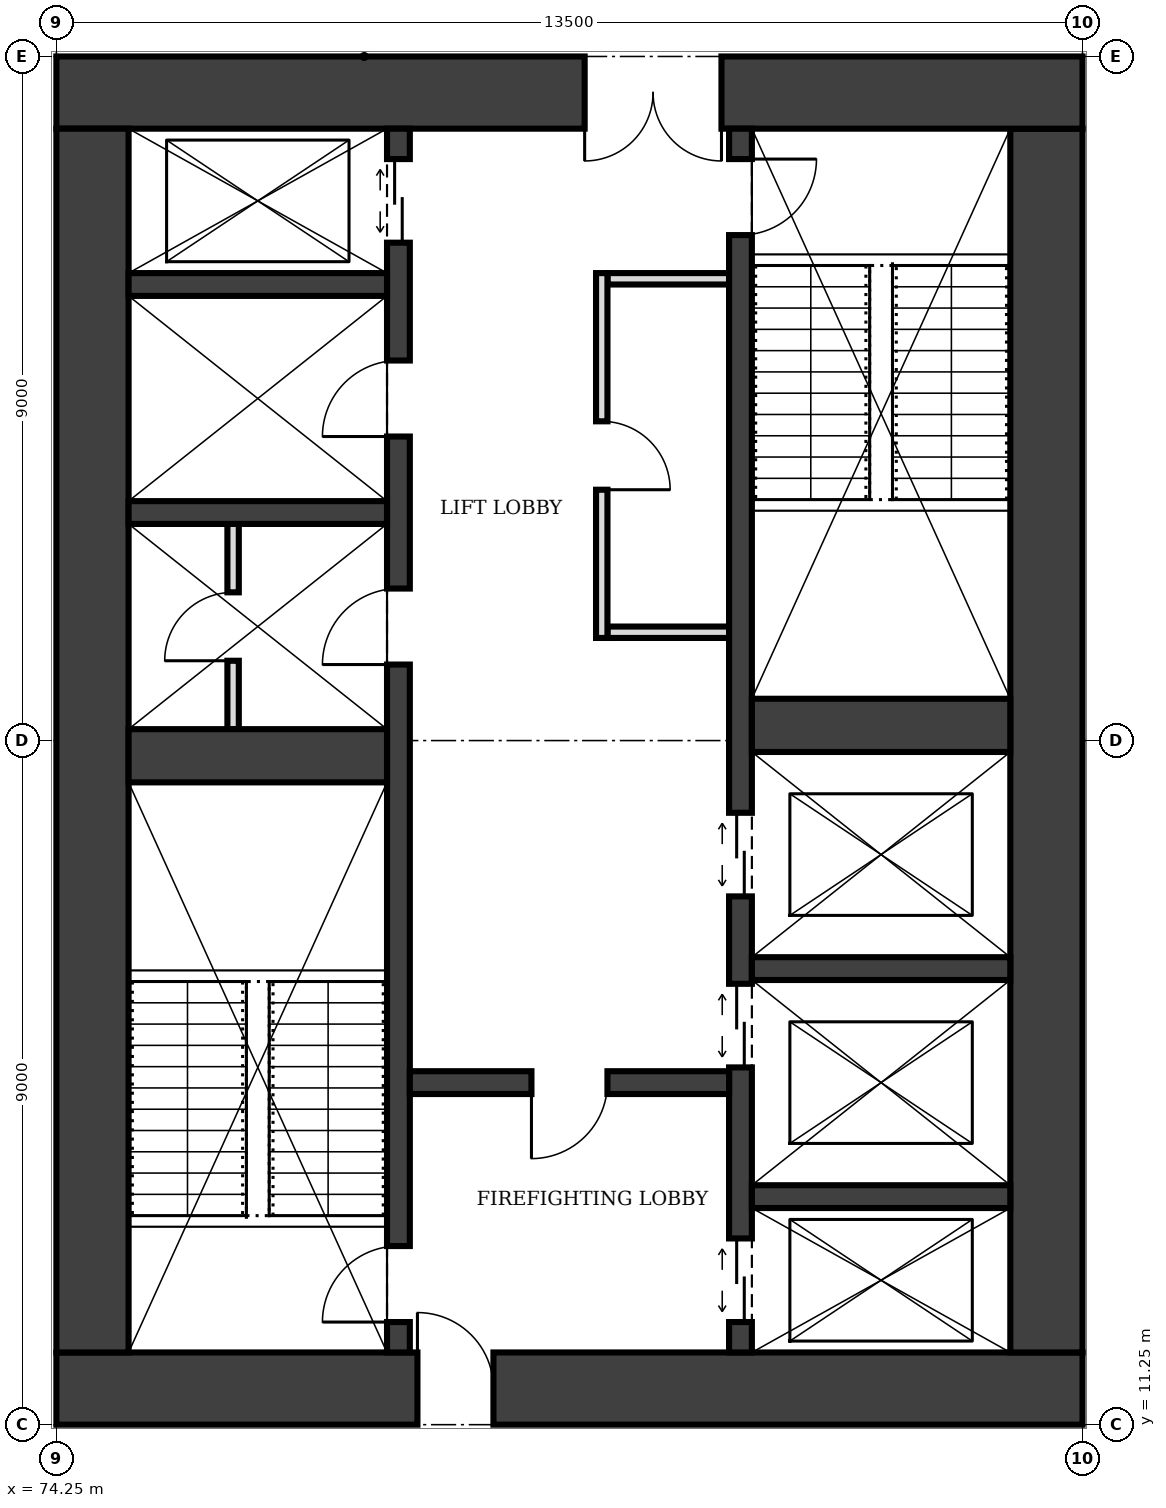
"""IFC4 building model, lengths in metres.
Left out: names, types, materials, properties, quantities, classifications, styles, units other than length and angle.
Written with IfcOpenShell. Run it as: python <this file> out.ifc"""

import sys

from ifc_helpers import new_model, si_unit, direction, frame, frame_2d, origin, place, context, subcontext, project, spatial, rectangle, extrude, element, fill, save


model = new_model("IFC4")
c1 = context("Model", 3, precision=1e-05, world=origin(), true_north=direction((0.0, 1.0)))
c2 = subcontext(c1, "Body", "Model", "MODEL_VIEW")
j1 = project(units=[si_unit("LENGTHUNIT", "METRE"), si_unit("PLANEANGLEUNIT", "RADIAN")], contexts=[c1])
p1 = place(None, origin())
s1 = spatial("IfcSite", under=j1, at=p1, CompositionType="ELEMENT")
p2 = place(p1, origin())
s2 = spatial("IfcBuilding", under=s1, at=p2, CompositionType="ELEMENT")
p3 = place(p2, frame((0.0, 0.0, 193.0)))
s3 = spatial("IfcBuildingStorey", under=s2, at=p3, CompositionType="ELEMENT", Elevation=193.0)
p4 = place(p3, frame((74.25, 11.725, 0.0), z_axis=(0.0, 0.0, 1.0), x_axis=(1.0, 0.0, 0.0)))
e1 = element("IfcWall", 1, at=p4, inside=s3, PredefinedType="SHEAR", context=c2, shape_type="SweptSolid", body=[
    extrude(rectangle(XDim=13.5, YDim=0.95, at=frame_2d((6.75, 0.0))), origin(), (0.0, 0.0, 1.0), 4.0),
])
p5 = place(p4, frame((4.75, 0.0, 0.0)))
e2 = element("IfcOpeningElement", 2, at=p5, cuts=e1, PredefinedType="OPENING", context=c2, shape_type="SweptSolid", body=[
    extrude(rectangle(XDim=1.0, YDim=2.1, at=frame_2d((0.5, 1.05))), frame((0.0, 0.485, 0.0), z_axis=(0.0, -1.0, 0.0), x_axis=(1.0, 0.0, 0.0)), (0.0, 0.0, 1.0), 0.97),
])
p6 = place(p3, frame((87.275, 12.2, 0.0), z_axis=(0.0, 0.0, 1.0), x_axis=(0.0, 1.0, 0.0)))
e3 = element("IfcWall", 3, at=p6, inside=s3, PredefinedType="SHEAR", context=c2, shape_type="SweptSolid", body=[
    extrude(rectangle(XDim=16.1, YDim=0.95, at=frame_2d((8.05, 0.0))), origin(), (0.0, 0.0, 1.0), 4.0),
])
p7 = place(p3, frame((87.75, 28.775, 0.0), z_axis=(0.0, 0.0, 1.0), x_axis=(-1.0, 0.0, 0.0)))
e4 = element("IfcWall", 4, at=p7, inside=s3, PredefinedType="SHEAR", context=c2, shape_type="SweptSolid", body=[
    extrude(rectangle(XDim=13.5, YDim=0.95, at=frame_2d((6.75, 0.0))), origin(), (0.0, 0.0, 1.0), 4.0),
])
p8 = place(p7, frame((4.75, 0.0, 0.0)))
e5 = element("IfcOpeningElement", 5, at=p8, cuts=e4, PredefinedType="OPENING", context=c2, shape_type="SweptSolid", body=[
    extrude(rectangle(XDim=1.8, YDim=2.1, at=frame_2d((0.9, 1.05))), frame((0.0, 0.485, 0.0), z_axis=(0.0, -1.0, 0.0), x_axis=(1.0, 0.0, 0.0)), (0.0, 0.0, 1.0), 0.97),
])
p9 = place(p3, frame((74.725, 28.3, 0.0), z_axis=(0.0, 0.0, 1.0), x_axis=(0.0, -1.0, 0.0)))
e6 = element("IfcWall", 6, at=p9, inside=s3, PredefinedType="SHEAR", context=c2, shape_type="SweptSolid", body=[
    extrude(rectangle(XDim=16.1, YDim=0.95, at=frame_2d((8.05, 0.0))), origin(), (0.0, 0.0, 1.0), 4.0),
])
p10 = place(p3, frame((78.75, 12.2, 0.0), z_axis=(0.0, 0.0, 1.0), x_axis=(0.0, 1.0, 0.0)))
e7 = element("IfcWall", 7, at=p10, inside=s3, PredefinedType="SHEAR", context=c2, shape_type="SweptSolid", body=[
    extrude(rectangle(XDim=16.1, YDim=0.3, at=frame_2d((8.05, 0.0))), origin(), (0.0, 0.0, 1.0), 4.0),
])
p11 = place(p10, frame((0.4, 0.0, 0.0)))
e8 = element("IfcOpeningElement", 8, at=p11, cuts=e7, PredefinedType="OPENING", context=c2, shape_type="SweptSolid", body=[
    extrude(rectangle(XDim=1.0, YDim=2.1, at=frame_2d((0.5, 1.05))), frame((0.0, 0.16, 0.0), z_axis=(0.0, -1.0, 0.0), x_axis=(1.0, 0.0, 0.0)), (0.0, 0.0, 1.0), 0.32),
])
p12 = place(p10, frame((14.6, 0.0, 0.0)))
e9 = element("IfcOpeningElement", 9, at=p12, cuts=e7, PredefinedType="OPENING", context=c2, shape_type="SweptSolid", body=[
    extrude(rectangle(XDim=1.1, YDim=2.1, at=frame_2d((0.55, 1.05))), frame((0.0, 0.16, 0.0), z_axis=(0.0, -1.0, 0.0), x_axis=(1.0, 0.0, 0.0)), (0.0, 0.0, 1.0), 0.32),
])
p13 = place(p10, frame((9.05, 0.0, 0.0)))
e10 = element("IfcOpeningElement", 10, at=p13, cuts=e7, PredefinedType="OPENING", context=c2, shape_type="SweptSolid", body=[
    extrude(rectangle(XDim=1.0, YDim=2.1, at=frame_2d((0.5, 1.05))), frame((0.0, 0.16, 0.0), z_axis=(0.0, -1.0, 0.0), x_axis=(1.0, 0.0, 0.0)), (0.0, 0.0, 1.0), 0.32),
])
p14 = place(p10, frame((12.05, 0.0, 0.0)))
e11 = element("IfcOpeningElement", 11, at=p14, cuts=e7, PredefinedType="OPENING", context=c2, shape_type="SweptSolid", body=[
    extrude(rectangle(XDim=1.0, YDim=2.1, at=frame_2d((0.5, 1.05))), frame((0.0, 0.16, 0.0), z_axis=(0.0, -1.0, 0.0), x_axis=(1.0, 0.0, 0.0)), (0.0, 0.0, 1.0), 0.32),
])
p15 = place(p3, frame((83.25, 12.2, 0.0), z_axis=(0.0, 0.0, 1.0), x_axis=(0.0, 1.0, 0.0)))
e12 = element("IfcWall", 12, at=p15, inside=s3, PredefinedType="SHEAR", context=c2, shape_type="SweptSolid", body=[
    extrude(rectangle(XDim=16.1, YDim=0.3, at=frame_2d((8.05, 0.0))), origin(), (0.0, 0.0, 1.0), 4.0),
])
p16 = place(p15, frame((14.7, 0.0, 0.0)))
e13 = element("IfcOpeningElement", 13, at=p16, cuts=e12, PredefinedType="OPENING", context=c2, shape_type="SweptSolid", body=[
    extrude(rectangle(XDim=1.0, YDim=2.1, at=frame_2d((0.5, 1.05))), frame((0.0, 0.16, 0.0), z_axis=(0.0, -1.0, 0.0), x_axis=(1.0, 0.0, 0.0)), (0.0, 0.0, 1.0), 0.32),
])
p17 = place(p15, frame((0.4, 0.0, 0.0)))
e14 = element("IfcOpeningElement", 14, at=p17, cuts=e12, PredefinedType="OPENING", context=c2, shape_type="SweptSolid", body=[
    extrude(rectangle(XDim=1.1, YDim=2.1, at=frame_2d((0.55, 1.05))), frame((0.0, 0.16, 0.0), z_axis=(0.0, -1.0, 0.0), x_axis=(1.0, 0.0, 0.0)), (0.0, 0.0, 1.0), 0.32),
])
p18 = place(p15, frame((3.75, 0.0, 0.0)))
e15 = element("IfcOpeningElement", 15, at=p18, cuts=e12, PredefinedType="OPENING", context=c2, shape_type="SweptSolid", body=[
    extrude(rectangle(XDim=1.1, YDim=2.1, at=frame_2d((0.55, 1.05))), frame((0.0, 0.16, 0.0), z_axis=(0.0, -1.0, 0.0), x_axis=(1.0, 0.0, 0.0)), (0.0, 0.0, 1.0), 0.32),
])
p19 = place(p15, frame((6.0, 0.0, 0.0)))
e16 = element("IfcOpeningElement", 16, at=p19, cuts=e12, PredefinedType="OPENING", context=c2, shape_type="SweptSolid", body=[
    extrude(rectangle(XDim=1.1, YDim=2.1, at=frame_2d((0.55, 1.05))), frame((0.0, 0.16, 0.0), z_axis=(0.0, -1.0, 0.0), x_axis=(1.0, 0.0, 0.0)), (0.0, 0.0, 1.0), 0.32),
])
p20 = place(p3, frame((75.2, 20.05, 0.0), z_axis=(0.0, 0.0, 1.0), x_axis=(1.0, 0.0, 0.0)))
e17 = element("IfcWall", 17, at=p20, inside=s3, PredefinedType="SHEAR", context=c2, shape_type="SweptSolid", body=[
    extrude(rectangle(XDim=3.4, YDim=0.7, at=frame_2d((1.7, 0.0))), origin(), (0.0, 0.0, 1.0), 4.0),
])
p21 = place(p3, frame((78.9, 15.75, 0.0), z_axis=(0.0, 0.0, 1.0), x_axis=(1.0, 0.0, 0.0)))
e18 = element("IfcWall", 18, at=p21, inside=s3, PredefinedType="SHEAR", context=c2, shape_type="SweptSolid", body=[
    extrude(rectangle(XDim=4.2, YDim=0.3, at=frame_2d((2.1, 0.0))), origin(), (0.0, 0.0, 1.0), 4.0),
])
p22 = place(p21, frame((1.6, 0.0, 0.0)))
e19 = element("IfcOpeningElement", 19, at=p22, cuts=e18, PredefinedType="OPENING", context=c2, shape_type="SweptSolid", body=[
    extrude(rectangle(XDim=1.0, YDim=2.1, at=frame_2d((0.5, 1.05))), frame((0.0, 0.16, 0.0), z_axis=(0.0, -1.0, 0.0), x_axis=(1.0, 0.0, 0.0)), (0.0, 0.0, 1.0), 0.32),
])
for number, where, z_axis, x_axis in (
    (20, (83.4, 14.25, 0.0), (0.0, 0.0, 1.0), (1.0, 0.0, 0.0)),
    (21, (83.4, 17.25, 0.0), (0.0, 0.0, 1.0), (1.0, 0.0, 0.0)),
):
    element("IfcWall", number, at=place(p3, frame(where, z_axis=z_axis, x_axis=x_axis)), inside=s3, PredefinedType="SHEAR", context=c2, shape_type="SweptSolid", body=[
        extrude(rectangle(XDim=3.4, YDim=0.3, at=frame_2d((1.7, 0.0))), origin(), (0.0, 0.0, 1.0), 4.0),
    ])
p23 = place(p3, frame((83.4, 20.45, 0.0), z_axis=(0.0, 0.0, 1.0), x_axis=(1.0, 0.0, 0.0)))
e22 = element("IfcWall", 22, at=p23, inside=s3, PredefinedType="SHEAR", context=c2, shape_type="SweptSolid", body=[
    extrude(rectangle(XDim=3.4, YDim=0.7, at=frame_2d((1.7, 0.0))), origin(), (0.0, 0.0, 1.0), 4.0),
])
for number, where, z_axis, x_axis in (
    (23, (75.2, 23.25, 0.0), (0.0, 0.0, 1.0), (1.0, 0.0, 0.0)),
    (24, (75.2, 26.25, 0.0), (0.0, 0.0, 1.0), (1.0, 0.0, 0.0)),
):
    element("IfcWall", number, at=place(p3, frame(where, z_axis=z_axis, x_axis=x_axis)), inside=s3, PredefinedType="SHEAR", context=c2, shape_type="SweptSolid", body=[
        extrude(rectangle(XDim=3.4, YDim=0.3, at=frame_2d((1.7, 0.0))), origin(), (0.0, 0.0, 1.0), 4.0),
    ])
p24 = place(p3, frame((81.425, 21.6, 0.0), z_axis=(0.0, 0.0, 1.0), x_axis=(0.0, 1.0, 0.0)))
e25 = element("IfcWall", 25, at=p24, inside=s3, PredefinedType="PARTITIONING", context=c2, shape_type="SweptSolid", body=[
    extrude(rectangle(XDim=4.8, YDim=0.15, at=frame_2d((2.4, 0.0))), origin(), (0.0, 0.0, 1.0), 3.75),
])
p25 = place(p24, frame((1.95, 0.0, 0.0)))
e26 = element("IfcOpeningElement", 26, at=p25, cuts=e25, PredefinedType="OPENING", context=c2, shape_type="SweptSolid", body=[
    extrude(rectangle(XDim=0.9, YDim=2.1, at=frame_2d((0.45, 1.05))), frame((0.0, 0.085, 0.0), z_axis=(0.0, -1.0, 0.0), x_axis=(1.0, 0.0, 0.0)), (0.0, 0.0, 1.0), 0.17),
])
for number, where, z_axis, x_axis in (
    (27, (81.5, 21.675, 0.0), (0.0, 0.0, 1.0), (1.0, 0.0, 0.0)),
    (28, (81.5, 26.325, 0.0), (0.0, 0.0, 1.0), (1.0, 0.0, 0.0)),
):
    element("IfcWall", number, at=place(p3, frame(where, z_axis=z_axis, x_axis=x_axis)), inside=s3, PredefinedType="PARTITIONING", context=c2, shape_type="SweptSolid", body=[
        extrude(rectangle(XDim=1.6, YDim=0.15, at=frame_2d((0.8, 0.0))), origin(), (0.0, 0.0, 1.0), 3.75),
    ])
p26 = place(p3, frame((76.575, 20.4, 0.0), z_axis=(0.0, 0.0, 1.0), x_axis=(0.0, 1.0, 0.0)))
e29 = element("IfcWall", 29, at=p26, inside=s3, PredefinedType="PARTITIONING", context=c2, shape_type="SweptSolid", body=[
    extrude(rectangle(XDim=2.7, YDim=0.15, at=frame_2d((1.35, 0.0))), origin(), (0.0, 0.0, 1.0), 3.75),
])
p27 = place(p26, frame((0.9, 0.0, 0.0)))
e30 = element("IfcOpeningElement", 30, at=p27, cuts=e29, PredefinedType="OPENING", context=c2, shape_type="SweptSolid", body=[
    extrude(rectangle(XDim=0.9, YDim=2.1, at=frame_2d((0.45, 1.05))), frame((0.0, 0.085, 0.0), z_axis=(0.0, -1.0, 0.0), x_axis=(1.0, 0.0, 0.0)), (0.0, 0.0, 1.0), 0.17),
])
p28 = place(p5, origin())
e31 = element("IfcDoor", 31, at=p28, inside=s3, OperationType="SINGLE_SWING_LEFT", PredefinedType="DOOR", context=c2, shape_type="SweptSolid", body=[
    extrude(rectangle(XDim=1.0, YDim=2.1, at=frame_2d((0.5, 1.05))), frame((0.0, 0.025, 0.0), z_axis=(0.0, -1.0, 0.0), x_axis=(1.0, 0.0, 0.0)), (0.0, 0.0, 1.0), 0.05),
])
fill(e2, e31)
p29 = place(p8, origin())
e32 = element("IfcDoor", 32, at=p29, inside=s3, OperationType="DOUBLE_DOOR_SINGLE_SWING", PredefinedType="DOOR", context=c2, shape_type="SweptSolid", body=[
    extrude(rectangle(XDim=1.8, YDim=2.1, at=frame_2d((0.9, 1.05))), frame((0.0, 0.025, 0.0), z_axis=(0.0, -1.0, 0.0), x_axis=(1.0, 0.0, 0.0)), (0.0, 0.0, 1.0), 0.05),
])
fill(e5, e32)
p30 = place(p22, frame((1.0, 0.0, 0.0), z_axis=(0.0, 0.0, 1.0), x_axis=(-1.0, 0.0, 0.0)))
e33 = element("IfcDoor", 33, at=p30, inside=s3, OperationType="SINGLE_SWING_RIGHT", PredefinedType="DOOR", context=c2, shape_type="SweptSolid", body=[
    extrude(rectangle(XDim=1.0, YDim=2.1, at=frame_2d((0.5, 1.05))), frame((0.0, 0.025, 0.0), z_axis=(0.0, -1.0, 0.0), x_axis=(1.0, 0.0, 0.0)), (0.0, 0.0, 1.0), 0.05),
])
fill(e19, e33)
p31 = place(p11, origin())
e34 = element("IfcDoor", 34, at=p31, inside=s3, OperationType="SINGLE_SWING_LEFT", PredefinedType="DOOR", context=c2, shape_type="SweptSolid", body=[
    extrude(rectangle(XDim=1.0, YDim=2.1, at=frame_2d((0.5, 1.05))), frame((0.0, 0.025, 0.0), z_axis=(0.0, -1.0, 0.0), x_axis=(1.0, 0.0, 0.0)), (0.0, 0.0, 1.0), 0.05),
])
fill(e8, e34)
p32 = place(p16, frame((1.0, 0.0, 0.0), z_axis=(0.0, 0.0, 1.0), x_axis=(-1.0, 0.0, 0.0)))
e35 = element("IfcDoor", 35, at=p32, inside=s3, OperationType="SINGLE_SWING_LEFT", PredefinedType="DOOR", context=c2, shape_type="SweptSolid", body=[
    extrude(rectangle(XDim=1.0, YDim=2.1, at=frame_2d((0.5, 1.05))), frame((0.0, 0.025, 0.0), z_axis=(0.0, -1.0, 0.0), x_axis=(1.0, 0.0, 0.0)), (0.0, 0.0, 1.0), 0.05),
])
fill(e13, e35)
p33 = place(p17, origin())
e36 = element("IfcDoor", 36, at=p33, inside=s3, OperationType="DOUBLE_DOOR_SLIDING", PredefinedType="DOOR", context=c2, shape_type="SweptSolid", body=[
    extrude(rectangle(XDim=1.1, YDim=2.1, at=frame_2d((0.55, 1.05))), frame((0.0, 0.025, 0.0), z_axis=(0.0, -1.0, 0.0), x_axis=(1.0, 0.0, 0.0)), (0.0, 0.0, 1.0), 0.05),
])
fill(e14, e36)
p34 = place(p12, origin())
e37 = element("IfcDoor", 37, at=p34, inside=s3, OperationType="DOUBLE_DOOR_SLIDING", PredefinedType="DOOR", context=c2, shape_type="SweptSolid", body=[
    extrude(rectangle(XDim=1.1, YDim=2.1, at=frame_2d((0.55, 1.05))), frame((0.0, 0.025, 0.0), z_axis=(0.0, -1.0, 0.0), x_axis=(1.0, 0.0, 0.0)), (0.0, 0.0, 1.0), 0.05),
])
fill(e9, e37)
p35 = place(p18, origin())
e38 = element("IfcDoor", 38, at=p35, inside=s3, OperationType="DOUBLE_DOOR_SLIDING", PredefinedType="DOOR", context=c2, shape_type="SweptSolid", body=[
    extrude(rectangle(XDim=1.1, YDim=2.1, at=frame_2d((0.55, 1.05))), frame((0.0, 0.025, 0.0), z_axis=(0.0, -1.0, 0.0), x_axis=(1.0, 0.0, 0.0)), (0.0, 0.0, 1.0), 0.05),
])
fill(e15, e38)
p36 = place(p19, origin())
e39 = element("IfcDoor", 39, at=p36, inside=s3, OperationType="DOUBLE_DOOR_SLIDING", PredefinedType="DOOR", context=c2, shape_type="SweptSolid", body=[
    extrude(rectangle(XDim=1.1, YDim=2.1, at=frame_2d((0.55, 1.05))), frame((0.0, 0.025, 0.0), z_axis=(0.0, -1.0, 0.0), x_axis=(1.0, 0.0, 0.0)), (0.0, 0.0, 1.0), 0.05),
])
fill(e16, e39)
p37 = place(p25, frame((0.9, 0.0, 0.0), z_axis=(0.0, 0.0, 1.0), x_axis=(-1.0, 0.0, 0.0)))
e40 = element("IfcDoor", 40, at=p37, inside=s3, OperationType="SINGLE_SWING_RIGHT", PredefinedType="DOOR", context=c2, shape_type="SweptSolid", body=[
    extrude(rectangle(XDim=0.9, YDim=2.1, at=frame_2d((0.45, 1.05))), frame((0.0, 0.025, 0.0), z_axis=(0.0, -1.0, 0.0), x_axis=(1.0, 0.0, 0.0)), (0.0, 0.0, 1.0), 0.05),
])
fill(e26, e40)
p38 = place(p13, origin())
e41 = element("IfcDoor", 41, at=p38, inside=s3, OperationType="SINGLE_SWING_LEFT", PredefinedType="DOOR", context=c2, shape_type="SweptSolid", body=[
    extrude(rectangle(XDim=1.0, YDim=2.1, at=frame_2d((0.5, 1.05))), frame((0.0, 0.025, 0.0), z_axis=(0.0, -1.0, 0.0), x_axis=(1.0, 0.0, 0.0)), (0.0, 0.0, 1.0), 0.05),
])
fill(e10, e41)
p39 = place(p27, origin())
e42 = element("IfcDoor", 42, at=p39, inside=s3, OperationType="SINGLE_SWING_LEFT", PredefinedType="DOOR", context=c2, shape_type="SweptSolid", body=[
    extrude(rectangle(XDim=0.9, YDim=2.1, at=frame_2d((0.45, 1.05))), frame((0.0, 0.025, 0.0), z_axis=(0.0, -1.0, 0.0), x_axis=(1.0, 0.0, 0.0)), (0.0, 0.0, 1.0), 0.05),
])
fill(e30, e42)
p40 = place(p14, origin())
e43 = element("IfcDoor", 43, at=p40, inside=s3, OperationType="SINGLE_SWING_LEFT", PredefinedType="DOOR", context=c2, shape_type="SweptSolid", body=[
    extrude(rectangle(XDim=1.0, YDim=2.1, at=frame_2d((0.5, 1.05))), frame((0.0, 0.025, 0.0), z_axis=(0.0, -1.0, 0.0), x_axis=(1.0, 0.0, 0.0)), (0.0, 0.0, 1.0), 0.05),
])
fill(e11, e43)
save(model, sys.argv[1])
